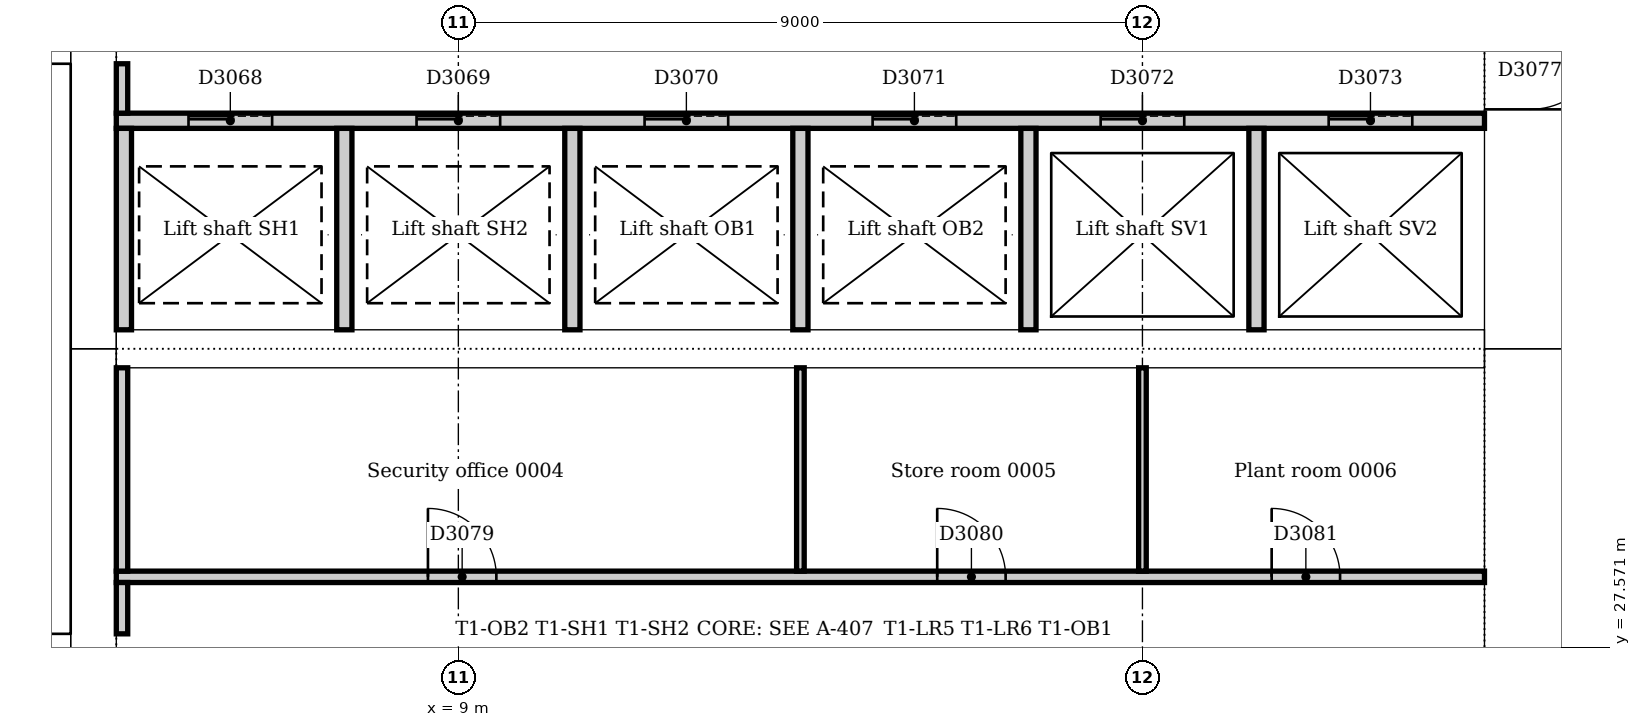
"""IFC4 building model, lengths in metres.
Left out: names, types, materials, properties, quantities, classifications, styles, units other than length and angle.
Written with IfcOpenShell. Run it as: python <this file> out.ifc"""

import sys

from ifc_helpers import new_model, si_unit, direction, frame, frame_2d, origin, place, context, subcontext, project, spatial, rectangle, extrude, element, fill, save


model = new_model("IFC4")
c1 = context("Model", 3, precision=1e-05, world=origin(), true_north=direction((0.0, 1.0)))
c2 = subcontext(c1, "Body", "Model", "MODEL_VIEW")
j1 = project(units=[si_unit("LENGTHUNIT", "METRE"), si_unit("PLANEANGLEUNIT", "RADIAN")], contexts=[c1])
p1 = place(None, origin())
s1 = spatial("IfcSite", under=j1, at=p1, CompositionType="ELEMENT")
p2 = place(p1, origin())
s2 = spatial("IfcBuilding", under=s1, at=p2, CompositionType="ELEMENT")
p3 = place(p2, origin())
s3 = spatial("IfcBuildingStorey", under=s2, at=p3, CompositionType="ELEMENT", Elevation=0.0)
p4 = place(p3, frame((23.1, 21.0, 0.0), z_axis=(0.0, 0.0, 1.0), x_axis=(0.0, 1.0, 0.0)))
e1 = element("IfcWall", 1, at=p4, inside=s3, PredefinedType="SOLIDWALL", context=c2, shape_type="SweptSolid", body=[
    extrude(rectangle(XDim=10.5, YDim=1.2, at=frame_2d((5.25, 0.0))), origin(), (0.0, 0.0, 1.0), 6.0),
])
p5 = place(p4, frame((4.35, 0.0, 0.0)))
e2 = element("IfcOpeningElement", 2, at=p5, cuts=e1, PredefinedType="OPENING", context=c2, shape_type="SweptSolid", body=[
    extrude(rectangle(XDim=1.8, YDim=2.1, at=frame_2d((0.9, 1.05))), frame((0.0, 0.61, 0.0), z_axis=(0.0, -1.0, 0.0), x_axis=(1.0, 0.0, 0.0)), (0.0, 0.0, 1.0), 1.22),
])
p6 = place(p3, frame((23.1, 31.5, 0.0), z_axis=(0.0, 0.0, 1.0), x_axis=(0.0, 1.0, 0.0)))
e3 = element("IfcWall", 3, at=p6, inside=s3, PredefinedType="SOLIDWALL", context=c2, shape_type="SweptSolid", body=[
    extrude(rectangle(XDim=10.5, YDim=1.2, at=frame_2d((5.25, 0.0))), origin(), (0.0, 0.0, 1.0), 6.0),
])
p7 = place(p6, frame((3.15, 0.0, 0.0)))
e4 = element("IfcOpeningElement", 4, at=p7, cuts=e3, PredefinedType="OPENING", context=c2, shape_type="SweptSolid", body=[
    extrude(rectangle(XDim=1.0, YDim=2.1, at=frame_2d((0.5, 1.05))), frame((0.0, 0.61, 0.0), z_axis=(0.0, -1.0, 0.0), x_axis=(1.0, 0.0, 0.0)), (0.0, 0.0, 1.0), 1.22),
])
p8 = place(p6, frame((5.2, 0.0, 0.0)))
e5 = element("IfcOpeningElement", 5, at=p8, cuts=e3, PredefinedType="OPENING", context=c2, shape_type="SweptSolid", body=[
    extrude(rectangle(XDim=1.0, YDim=2.1, at=frame_2d((0.5, 1.05))), frame((0.0, 0.61, 0.0), z_axis=(0.0, -1.0, 0.0), x_axis=(1.0, 0.0, 0.0)), (0.0, 0.0, 1.0), 1.22),
])
p9 = place(p3, frame((4.2, 42.0, 0.0), z_axis=(0.0, 0.0, 1.0), x_axis=(0.0, -1.0, 0.0)))
e6 = element("IfcWall", 6, at=p9, inside=s3, PredefinedType="SOLIDWALL", context=c2, shape_type="SweptSolid", body=[
    extrude(rectangle(XDim=10.5, YDim=0.6, at=frame_2d((5.25, 0.0))), origin(), (0.0, 0.0, 1.0), 6.0),
])
p10 = place(p9, frame((5.3, 0.0, 0.0)))
e7 = element("IfcOpeningElement", 7, at=p10, cuts=e6, PredefinedType="OPENING", context=c2, shape_type="SweptSolid", body=[
    extrude(rectangle(XDim=1.0, YDim=2.1, at=frame_2d((0.5, 1.05))), frame((0.0, 0.31, 0.0), z_axis=(0.0, -1.0, 0.0), x_axis=(1.0, 0.0, 0.0)), (0.0, 0.0, 1.0), 0.62),
])
p11 = place(p3, frame((4.2, 31.5, 0.0), z_axis=(0.0, 0.0, 1.0), x_axis=(0.0, -1.0, 0.0)))
e8 = element("IfcWall", 8, at=p11, inside=s3, PredefinedType="SOLIDWALL", context=c2, shape_type="SweptSolid", body=[
    extrude(rectangle(XDim=10.5, YDim=0.6, at=frame_2d((5.25, 0.0))), origin(), (0.0, 0.0, 1.0), 6.0),
])
p12 = place(p11, frame((4.25, 0.0, 0.0)))
e9 = element("IfcOpeningElement", 9, at=p12, cuts=e8, PredefinedType="OPENING", context=c2, shape_type="SweptSolid", body=[
    extrude(rectangle(XDim=1.0, YDim=2.1, at=frame_2d((0.5, 1.05))), frame((0.0, 0.31, 0.0), z_axis=(0.0, -1.0, 0.0), x_axis=(1.0, 0.0, 0.0)), (0.0, 0.0, 1.0), 0.62),
])
p13 = place(p3, frame((4.5, 31.5, 0.0), z_axis=(0.0, 0.0, 1.0), x_axis=(1.0, 0.0, 0.0)))
e10 = element("IfcWall", 10, at=p13, inside=s3, PredefinedType="SOLIDWALL", context=c2, shape_type="SweptSolid", body=[
    extrude(rectangle(XDim=18.0, YDim=0.5, at=frame_2d((9.0, 0.0))), origin(), (0.0, 0.0, 1.0), 6.0),
])
p14 = place(p3, frame((3.9, 27.625, 0.0), z_axis=(0.0, 0.0, 1.0), x_axis=(-1.0, 0.0, 0.0)))
e11 = element("IfcWall", 11, at=p14, inside=s3, PredefinedType="SOLIDWALL", context=c2, shape_type="SweptSolid", body=[
    extrude(rectangle(XDim=3.54, YDim=0.25, at=frame_2d((1.77, 0.0))), origin(), (0.0, 0.0, 1.0), 6.0),
])
p15 = place(p14, frame((0.4, 0.0, 0.0)))
e12 = element("IfcOpeningElement", 12, at=p15, cuts=e11, PredefinedType="OPENING", context=c2, shape_type="SweptSolid", body=[
    extrude(rectangle(XDim=1.0, YDim=2.1, at=frame_2d((0.5, 1.05))), frame((0.0, 0.135, 0.0), z_axis=(0.0, -1.0, 0.0), x_axis=(1.0, 0.0, 0.0)), (0.0, 0.0, 1.0), 0.27),
])
p16 = place(p3, frame((0.36, 35.375, 0.0), z_axis=(0.0, 0.0, 1.0), x_axis=(1.0, 0.0, 0.0)))
e13 = element("IfcWall", 13, at=p16, inside=s3, PredefinedType="SOLIDWALL", context=c2, shape_type="SweptSolid", body=[
    extrude(rectangle(XDim=3.54, YDim=0.25, at=frame_2d((1.77, 0.0))), origin(), (0.0, 0.0, 1.0), 6.0),
])
p17 = place(p16, frame((2.14, 0.0, 0.0)))
e14 = element("IfcOpeningElement", 14, at=p17, cuts=e13, PredefinedType="OPENING", context=c2, shape_type="SweptSolid", body=[
    extrude(rectangle(XDim=1.0, YDim=2.1, at=frame_2d((0.5, 1.05))), frame((0.0, 0.135, 0.0), z_axis=(0.0, -1.0, 0.0), x_axis=(1.0, 0.0, 0.0)), (0.0, 0.0, 1.0), 0.27),
])
p18 = place(p3, frame((4.5, 34.5, 0.0), z_axis=(0.0, 0.0, 1.0), x_axis=(1.0, 0.0, 0.0)))
e15 = element("IfcWall", 15, at=p18, inside=s3, PredefinedType="PARTITIONING", context=c2, shape_type="SweptSolid", body=[
    extrude(rectangle(XDim=18.0, YDim=0.2, at=frame_2d((9.0, 0.0))), origin(), (0.0, 0.0, 1.0), 5.7),
])
p19 = place(p18, frame((0.95, 0.0, 0.0)))
e16 = element("IfcOpeningElement", 16, at=p19, cuts=e15, PredefinedType="OPENING", context=c2, shape_type="SweptSolid", body=[
    extrude(rectangle(XDim=1.1, YDim=2.1, at=frame_2d((0.55, 1.05))), frame((0.0, 0.11, 0.0), z_axis=(0.0, -1.0, 0.0), x_axis=(1.0, 0.0, 0.0)), (0.0, 0.0, 1.0), 0.22),
])
p20 = place(p18, frame((3.95, 0.0, 0.0)))
e17 = element("IfcOpeningElement", 17, at=p20, cuts=e15, PredefinedType="OPENING", context=c2, shape_type="SweptSolid", body=[
    extrude(rectangle(XDim=1.1, YDim=2.1, at=frame_2d((0.55, 1.05))), frame((0.0, 0.11, 0.0), z_axis=(0.0, -1.0, 0.0), x_axis=(1.0, 0.0, 0.0)), (0.0, 0.0, 1.0), 0.22),
])
p21 = place(p18, frame((6.95, 0.0, 0.0)))
e18 = element("IfcOpeningElement", 18, at=p21, cuts=e15, PredefinedType="OPENING", context=c2, shape_type="SweptSolid", body=[
    extrude(rectangle(XDim=1.1, YDim=2.1, at=frame_2d((0.55, 1.05))), frame((0.0, 0.11, 0.0), z_axis=(0.0, -1.0, 0.0), x_axis=(1.0, 0.0, 0.0)), (0.0, 0.0, 1.0), 0.22),
])
p22 = place(p18, frame((9.95, 0.0, 0.0)))
e19 = element("IfcOpeningElement", 19, at=p22, cuts=e15, PredefinedType="OPENING", context=c2, shape_type="SweptSolid", body=[
    extrude(rectangle(XDim=1.1, YDim=2.1, at=frame_2d((0.55, 1.05))), frame((0.0, 0.11, 0.0), z_axis=(0.0, -1.0, 0.0), x_axis=(1.0, 0.0, 0.0)), (0.0, 0.0, 1.0), 0.22),
])
p23 = place(p18, frame((12.95, 0.0, 0.0)))
e20 = element("IfcOpeningElement", 20, at=p23, cuts=e15, PredefinedType="OPENING", context=c2, shape_type="SweptSolid", body=[
    extrude(rectangle(XDim=1.1, YDim=2.1, at=frame_2d((0.55, 1.05))), frame((0.0, 0.11, 0.0), z_axis=(0.0, -1.0, 0.0), x_axis=(1.0, 0.0, 0.0)), (0.0, 0.0, 1.0), 0.22),
])
p24 = place(p18, frame((15.95, 0.0, 0.0)))
e21 = element("IfcOpeningElement", 21, at=p24, cuts=e15, PredefinedType="OPENING", context=c2, shape_type="SweptSolid", body=[
    extrude(rectangle(XDim=1.1, YDim=2.1, at=frame_2d((0.55, 1.05))), frame((0.0, 0.11, 0.0), z_axis=(0.0, -1.0, 0.0), x_axis=(1.0, 0.0, 0.0)), (0.0, 0.0, 1.0), 0.22),
])
for number, where, z_axis, x_axis in (
    (22, (4.6, 31.75, 0.0), (0.0, 0.0, 1.0), (0.0, 1.0, 0.0)),
    (23, (7.5, 31.75, 0.0), (0.0, 0.0, 1.0), (0.0, 1.0, 0.0)),
    (24, (10.5, 31.75, 0.0), (0.0, 0.0, 1.0), (0.0, 1.0, 0.0)),
    (25, (13.5, 31.75, 0.0), (0.0, 0.0, 1.0), (0.0, 1.0, 0.0)),
    (26, (16.5, 31.75, 0.0), (0.0, 0.0, 1.0), (0.0, 1.0, 0.0)),
    (27, (19.5, 31.75, 0.0), (0.0, 0.0, 1.0), (0.0, 1.0, 0.0)),
):
    element("IfcWall", number, at=place(p3, frame(where, z_axis=z_axis, x_axis=x_axis)), inside=s3, PredefinedType="PARTITIONING", context=c2, shape_type="SweptSolid", body=[
        extrude(rectangle(XDim=2.65, YDim=0.2, at=frame_2d((1.325, 0.0))), origin(), (0.0, 0.0, 1.0), 5.7),
    ])
p25 = place(p3, frame((4.5, 28.5, 0.0), z_axis=(0.0, 0.0, 1.0), x_axis=(1.0, 0.0, 0.0)))
e28 = element("IfcWall", 28, at=p25, inside=s3, PredefinedType="PARTITIONING", context=c2, shape_type="SweptSolid", body=[
    extrude(rectangle(XDim=18.0, YDim=0.15, at=frame_2d((9.0, 0.0))), origin(), (0.0, 0.0, 1.0), 5.7),
])
p26 = place(p25, frame((4.1, 0.0, 0.0)))
e29 = element("IfcOpeningElement", 29, at=p26, cuts=e28, PredefinedType="OPENING", context=c2, shape_type="SweptSolid", body=[
    extrude(rectangle(XDim=0.9, YDim=2.1, at=frame_2d((0.45, 1.05))), frame((0.0, 0.085, 0.0), z_axis=(0.0, -1.0, 0.0), x_axis=(1.0, 0.0, 0.0)), (0.0, 0.0, 1.0), 0.17),
])
p27 = place(p25, frame((10.8, 0.0, 0.0)))
e30 = element("IfcOpeningElement", 30, at=p27, cuts=e28, PredefinedType="OPENING", context=c2, shape_type="SweptSolid", body=[
    extrude(rectangle(XDim=0.9, YDim=2.1, at=frame_2d((0.45, 1.05))), frame((0.0, 0.085, 0.0), z_axis=(0.0, -1.0, 0.0), x_axis=(1.0, 0.0, 0.0)), (0.0, 0.0, 1.0), 0.17),
])
p28 = place(p25, frame((15.2, 0.0, 0.0)))
e31 = element("IfcOpeningElement", 31, at=p28, cuts=e28, PredefinedType="OPENING", context=c2, shape_type="SweptSolid", body=[
    extrude(rectangle(XDim=0.9, YDim=2.1, at=frame_2d((0.45, 1.05))), frame((0.0, 0.085, 0.0), z_axis=(0.0, -1.0, 0.0), x_axis=(1.0, 0.0, 0.0)), (0.0, 0.0, 1.0), 0.17),
])
p29 = place(p3, frame((4.575, 27.75, 0.0), z_axis=(0.0, 0.0, 1.0), x_axis=(0.0, 1.0, 0.0)))
e32 = element("IfcWall", 32, at=p29, inside=s3, PredefinedType="PARTITIONING", context=c2, shape_type="SweptSolid", body=[
    extrude(rectangle(XDim=0.675, YDim=0.15, at=frame_2d((0.338, 0.0))), origin(), (0.0, 0.0, 1.0), 5.7),
])
p30 = place(p3, frame((4.575, 28.575, 0.0), z_axis=(0.0, 0.0, 1.0), x_axis=(0.0, 1.0, 0.0)))
e33 = element("IfcWall", 33, at=p30, inside=s3, PredefinedType="PARTITIONING", context=c2, shape_type="SweptSolid", body=[
    extrude(rectangle(XDim=2.675, YDim=0.15, at=frame_2d((1.337, 0.0))), origin(), (0.0, 0.0, 1.0), 5.7),
])
p31 = place(p3, frame((4.575, 34.6, 0.0), z_axis=(0.0, 0.0, 1.0), x_axis=(0.0, 1.0, 0.0)))
e34 = element("IfcWall", 34, at=p31, inside=s3, PredefinedType="PARTITIONING", context=c2, shape_type="SweptSolid", body=[
    extrude(rectangle(XDim=0.65, YDim=0.15, at=frame_2d((0.325, 0.0))), origin(), (0.0, 0.0, 1.0), 5.7),
])
for number, where, z_axis, x_axis in (
    (35, (13.5, 28.575, 0.0), (0.0, 0.0, 1.0), (0.0, 1.0, 0.0)),
    (36, (18.0, 28.575, 0.0), (0.0, 0.0, 1.0), (0.0, 1.0, 0.0)),
):
    element("IfcWall", number, at=place(p3, frame(where, z_axis=z_axis, x_axis=x_axis)), inside=s3, PredefinedType="PARTITIONING", context=c2, shape_type="SweptSolid", body=[
        extrude(rectangle(XDim=2.675, YDim=0.1, at=frame_2d((1.337, 0.0))), origin(), (0.0, 0.0, 1.0), 5.7),
    ])
p32 = place(p19, origin())
e37 = element("IfcDoor", 37, at=p32, inside=s3, OperationType="SLIDING_TO_LEFT", PredefinedType="DOOR", context=c2, shape_type="SweptSolid", body=[
    extrude(rectangle(XDim=1.1, YDim=2.1, at=frame_2d((0.55, 1.05))), frame((0.0, 0.025, 0.0), z_axis=(0.0, -1.0, 0.0), x_axis=(1.0, 0.0, 0.0)), (0.0, 0.0, 1.0), 0.05),
])
fill(e16, e37)
p33 = place(p20, origin())
e38 = element("IfcDoor", 38, at=p33, inside=s3, OperationType="SLIDING_TO_LEFT", PredefinedType="DOOR", context=c2, shape_type="SweptSolid", body=[
    extrude(rectangle(XDim=1.1, YDim=2.1, at=frame_2d((0.55, 1.05))), frame((0.0, 0.025, 0.0), z_axis=(0.0, -1.0, 0.0), x_axis=(1.0, 0.0, 0.0)), (0.0, 0.0, 1.0), 0.05),
])
fill(e17, e38)
p34 = place(p21, origin())
e39 = element("IfcDoor", 39, at=p34, inside=s3, OperationType="SLIDING_TO_LEFT", PredefinedType="DOOR", context=c2, shape_type="SweptSolid", body=[
    extrude(rectangle(XDim=1.1, YDim=2.1, at=frame_2d((0.55, 1.05))), frame((0.0, 0.025, 0.0), z_axis=(0.0, -1.0, 0.0), x_axis=(1.0, 0.0, 0.0)), (0.0, 0.0, 1.0), 0.05),
])
fill(e18, e39)
p35 = place(p22, origin())
e40 = element("IfcDoor", 40, at=p35, inside=s3, OperationType="SLIDING_TO_LEFT", PredefinedType="DOOR", context=c2, shape_type="SweptSolid", body=[
    extrude(rectangle(XDim=1.1, YDim=2.1, at=frame_2d((0.55, 1.05))), frame((0.0, 0.025, 0.0), z_axis=(0.0, -1.0, 0.0), x_axis=(1.0, 0.0, 0.0)), (0.0, 0.0, 1.0), 0.05),
])
fill(e19, e40)
p36 = place(p23, origin())
e41 = element("IfcDoor", 41, at=p36, inside=s3, OperationType="SLIDING_TO_LEFT", PredefinedType="DOOR", context=c2, shape_type="SweptSolid", body=[
    extrude(rectangle(XDim=1.1, YDim=2.1, at=frame_2d((0.55, 1.05))), frame((0.0, 0.025, 0.0), z_axis=(0.0, -1.0, 0.0), x_axis=(1.0, 0.0, 0.0)), (0.0, 0.0, 1.0), 0.05),
])
fill(e20, e41)
p37 = place(p24, origin())
e42 = element("IfcDoor", 42, at=p37, inside=s3, OperationType="SLIDING_TO_LEFT", PredefinedType="DOOR", context=c2, shape_type="SweptSolid", body=[
    extrude(rectangle(XDim=1.1, YDim=2.1, at=frame_2d((0.55, 1.05))), frame((0.0, 0.025, 0.0), z_axis=(0.0, -1.0, 0.0), x_axis=(1.0, 0.0, 0.0)), (0.0, 0.0, 1.0), 0.05),
])
fill(e21, e42)
p38 = place(p7, frame((1.0, 0.0, 0.0), z_axis=(0.0, 0.0, 1.0), x_axis=(-1.0, 0.0, 0.0)))
e43 = element("IfcDoor", 43, at=p38, inside=s3, OperationType="SINGLE_SWING_LEFT", PredefinedType="DOOR", context=c2, shape_type="SweptSolid", body=[
    extrude(rectangle(XDim=1.0, YDim=2.1, at=frame_2d((0.5, 1.05))), frame((0.0, 0.025, 0.0), z_axis=(0.0, -1.0, 0.0), x_axis=(1.0, 0.0, 0.0)), (0.0, 0.0, 1.0), 0.05),
])
fill(e4, e43)
p39 = place(p26, origin())
e44 = element("IfcDoor", 44, at=p39, inside=s3, OperationType="SINGLE_SWING_LEFT", PredefinedType="DOOR", context=c2, shape_type="SweptSolid", body=[
    extrude(rectangle(XDim=0.9, YDim=2.1, at=frame_2d((0.45, 1.05))), frame((0.0, 0.025, 0.0), z_axis=(0.0, -1.0, 0.0), x_axis=(1.0, 0.0, 0.0)), (0.0, 0.0, 1.0), 0.05),
])
fill(e29, e44)
p40 = place(p27, origin())
e45 = element("IfcDoor", 45, at=p40, inside=s3, OperationType="SINGLE_SWING_LEFT", PredefinedType="DOOR", context=c2, shape_type="SweptSolid", body=[
    extrude(rectangle(XDim=0.9, YDim=2.1, at=frame_2d((0.45, 1.05))), frame((0.0, 0.025, 0.0), z_axis=(0.0, -1.0, 0.0), x_axis=(1.0, 0.0, 0.0)), (0.0, 0.0, 1.0), 0.05),
])
fill(e30, e45)
p41 = place(p28, origin())
e46 = element("IfcDoor", 46, at=p41, inside=s3, OperationType="SINGLE_SWING_LEFT", PredefinedType="DOOR", context=c2, shape_type="SweptSolid", body=[
    extrude(rectangle(XDim=0.9, YDim=2.1, at=frame_2d((0.45, 1.05))), frame((0.0, 0.025, 0.0), z_axis=(0.0, -1.0, 0.0), x_axis=(1.0, 0.0, 0.0)), (0.0, 0.0, 1.0), 0.05),
])
fill(e31, e46)
save(model, sys.argv[1])
